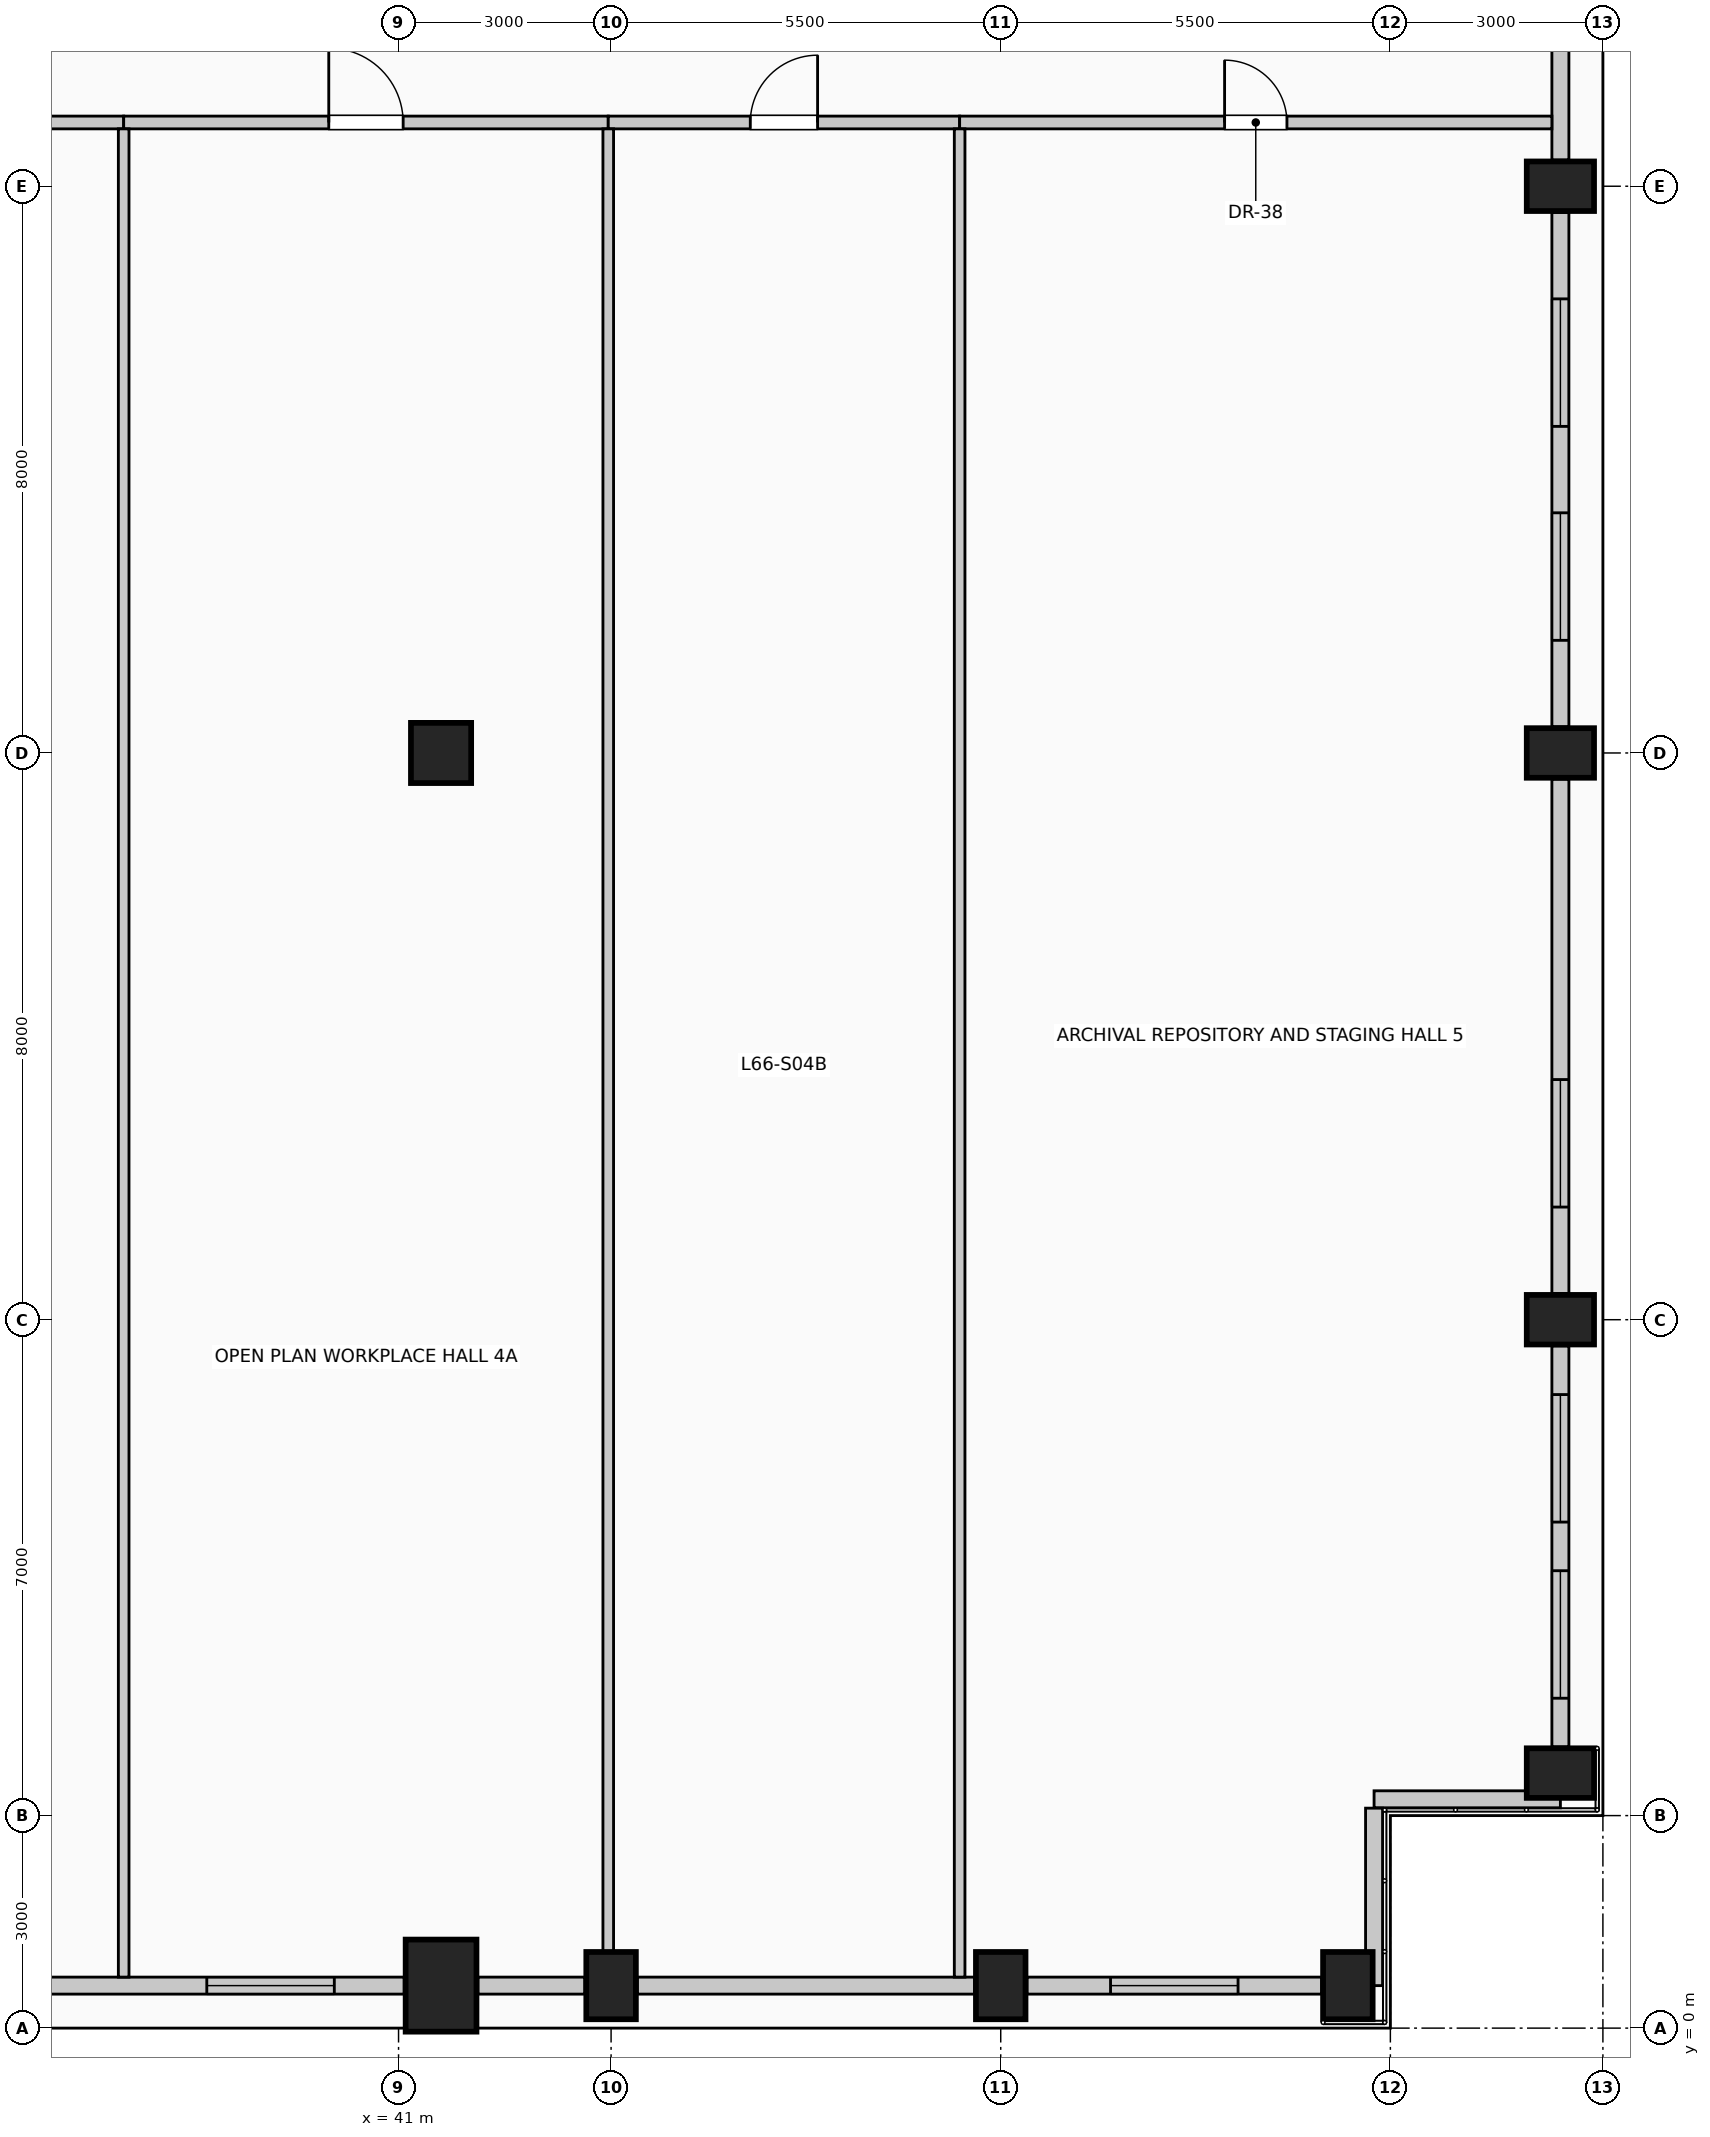
"""IFC4 building model, lengths in metres.
Left out: names, types, materials, properties, quantities, classifications, styles, units other than length and angle.
Written with IfcOpenShell. Run it as: python <this file> out.ifc"""

import sys

from ifc_helpers import new_model, si_unit, direction, frame, frame_2d, origin, origin_2d, place, context, subcontext, project, spatial, rectangle, circle, extrude, element, fill, save


model = new_model("IFC4")
c1 = context("Model", 3, precision=1e-05, world=origin(), true_north=direction((0.0, 1.0)))
c2 = subcontext(c1, "Body", "Model", "MODEL_VIEW")
j1 = project(units=[si_unit("LENGTHUNIT", "METRE"), si_unit("PLANEANGLEUNIT", "RADIAN")], contexts=[c1])
p1 = place(None, origin())
s1 = spatial("IfcSite", under=j1, at=p1, CompositionType="ELEMENT")
p2 = place(p1, origin())
s2 = spatial("IfcBuilding", under=s1, at=p2, CompositionType="ELEMENT")
p3 = place(p2, frame((0.0, 0.0, 272.6)))
s3 = spatial("IfcBuildingStorey", under=s2, at=p3, CompositionType="ELEMENT", Elevation=272.6)
p4 = place(p3, frame((41.6, 0.6, 0.0), z_axis=(0.0, 0.0, 1.0), x_axis=(1.0, 0.0, 0.0)))
e1 = element("IfcColumn", 1, at=p4, inside=s3, PredefinedType="COLUMN", context=c2, shape_type="SweptSolid", body=[
    extrude(rectangle(XDim=1.0, YDim=1.3, at=origin_2d()), origin(), (0.0, 0.0, 1.0), 4.0),
])
for number, where, z_axis, x_axis in (
    (2, (44.0, 0.6, 0.0), (0.0, 0.0, 1.0), (1.0, 0.0, 0.0)),
    (3, (49.5, 0.6, 0.0), (0.0, 0.0, 1.0), (1.0, 0.0, 0.0)),
    (4, (54.4, 0.6, 0.0), (0.0, 0.0, 1.0), (1.0, 0.0, 0.0)),
    (5, (57.4, 3.6, 0.0), (0.0, 0.0, 1.0), (0.0, 1.0, 0.0)),
    (6, (57.4, 10.0, 0.0), (0.0, 0.0, 1.0), (0.0, 1.0, 0.0)),
    (7, (57.4, 18.0, 0.0), (0.0, 0.0, 1.0), (0.0, 1.0, 0.0)),
    (8, (57.4, 26.0, 0.0), (0.0, 0.0, 1.0), (0.0, 1.0, 0.0)),
):
    element("IfcColumn", number, at=place(p3, frame(where, z_axis=z_axis, x_axis=x_axis)), inside=s3, PredefinedType="COLUMN", context=c2, shape_type="SweptSolid", body=[
        extrude(rectangle(XDim=0.7, YDim=0.95, at=origin_2d()), origin(), (0.0, 0.0, 1.0), 4.0),
    ])
p5 = place(p3, frame((41.6, 18.0, 0.0), z_axis=(0.0, 0.0, 1.0), x_axis=(1.0, 0.0, 0.0)))
e9 = element("IfcColumn", 9, at=p5, inside=s3, PredefinedType="COLUMN", context=c2, shape_type="SweptSolid", body=[
    extrude(circle(Radius=0.425, at=origin_2d()), origin(), (0.0, 0.0, 1.0), 4.0),
])
p6 = place(p3, frame((41.08, 0.6, 0.0), z_axis=(0.0, 0.0, 1.0), x_axis=(-1.0, 0.0, 0.0)))
e10 = element("IfcWall", 10, at=p6, inside=s3, PredefinedType="SOLIDWALL", context=c2, shape_type="SweptSolid", body=[
    extrude(rectangle(XDim=6.56, YDim=0.24, at=frame_2d((3.28, 0.0))), origin(), (0.0, 0.0, 1.0), 3.0),
])
p7 = place(p6, frame((0.987, 0.0, 0.42)))
e11 = element("IfcOpeningElement", 11, at=p7, cuts=e10, PredefinedType="OPENING", context=c2, shape_type="SweptSolid", body=[
    extrude(rectangle(XDim=1.8, YDim=2.2, at=frame_2d((0.9, 1.1))), frame((0.0, 0.13, 0.0), z_axis=(0.0, -1.0, 0.0), x_axis=(1.0, 0.0, 0.0)), (0.0, 0.0, 1.0), 0.26),
])
p8 = place(p3, frame((43.63, 0.6, 0.0), z_axis=(0.0, 0.0, 1.0), x_axis=(-1.0, 0.0, 0.0)))
e12 = element("IfcWall", 12, at=p8, inside=s3, PredefinedType="SOLIDWALL", context=c2, shape_type="SweptSolid", body=[
    extrude(rectangle(XDim=1.51, YDim=0.24, at=frame_2d((0.755, 0.0))), origin(), (0.0, 0.0, 1.0), 3.0),
])
p9 = place(p3, frame((49.13, 0.6, 0.0), z_axis=(0.0, 0.0, 1.0), x_axis=(-1.0, 0.0, 0.0)))
e13 = element("IfcWall", 13, at=p9, inside=s3, PredefinedType="SOLIDWALL", context=c2, shape_type="SweptSolid", body=[
    extrude(rectangle(XDim=4.76, YDim=0.24, at=frame_2d((2.38, 0.0))), origin(), (0.0, 0.0, 1.0), 3.0),
])
p10 = place(p3, frame((54.03, 0.6, 0.0), z_axis=(0.0, 0.0, 1.0), x_axis=(-1.0, 0.0, 0.0)))
e14 = element("IfcWall", 14, at=p10, inside=s3, PredefinedType="SOLIDWALL", context=c2, shape_type="SweptSolid", body=[
    extrude(rectangle(XDim=4.16, YDim=0.24, at=frame_2d((2.08, 0.0))), origin(), (0.0, 0.0, 1.0), 3.0),
])
p11 = place(p10, frame((1.18, 0.0, 0.42)))
e15 = element("IfcOpeningElement", 15, at=p11, cuts=e14, PredefinedType="OPENING", context=c2, shape_type="SweptSolid", body=[
    extrude(rectangle(XDim=1.8, YDim=2.2, at=frame_2d((0.9, 1.1))), frame((0.0, 0.13, 0.0), z_axis=(0.0, -1.0, 0.0), x_axis=(1.0, 0.0, 0.0)), (0.0, 0.0, 1.0), 0.26),
])
p12 = place(p3, frame((57.4, 9.63, 0.0), z_axis=(0.0, 0.0, 1.0), x_axis=(0.0, -1.0, 0.0)))
e16 = element("IfcWall", 16, at=p12, inside=s3, PredefinedType="SOLIDWALL", context=c2, shape_type="SweptSolid", body=[
    extrude(rectangle(XDim=5.66, YDim=0.24, at=frame_2d((2.83, 0.0))), origin(), (0.0, 0.0, 1.0), 3.0),
])
p13 = place(p12, frame((0.687, 0.0, 0.42)))
e17 = element("IfcOpeningElement", 17, at=p13, cuts=e16, PredefinedType="OPENING", context=c2, shape_type="SweptSolid", body=[
    extrude(rectangle(XDim=1.8, YDim=2.2, at=frame_2d((0.9, 1.1))), frame((0.0, 0.13, 0.0), z_axis=(0.0, -1.0, 0.0), x_axis=(1.0, 0.0, 0.0)), (0.0, 0.0, 1.0), 0.26),
])
p14 = place(p12, frame((3.173, 0.0, 0.42)))
e18 = element("IfcOpeningElement", 18, at=p14, cuts=e16, PredefinedType="OPENING", context=c2, shape_type="SweptSolid", body=[
    extrude(rectangle(XDim=1.8, YDim=2.2, at=frame_2d((0.9, 1.1))), frame((0.0, 0.13, 0.0), z_axis=(0.0, -1.0, 0.0), x_axis=(1.0, 0.0, 0.0)), (0.0, 0.0, 1.0), 0.26),
])
p15 = place(p3, frame((57.4, 17.63, 0.0), z_axis=(0.0, 0.0, 1.0), x_axis=(0.0, -1.0, 0.0)))
e19 = element("IfcWall", 19, at=p15, inside=s3, PredefinedType="SOLIDWALL", context=c2, shape_type="SweptSolid", body=[
    extrude(rectangle(XDim=7.26, YDim=0.24, at=frame_2d((3.63, 0.0))), origin(), (0.0, 0.0, 1.0), 3.0),
])
p16 = place(p15, frame((4.24, 0.0, 0.42)))
e20 = element("IfcOpeningElement", 20, at=p16, cuts=e19, PredefinedType="OPENING", context=c2, shape_type="SweptSolid", body=[
    extrude(rectangle(XDim=1.8, YDim=2.2, at=frame_2d((0.9, 1.1))), frame((0.0, 0.13, 0.0), z_axis=(0.0, -1.0, 0.0), x_axis=(1.0, 0.0, 0.0)), (0.0, 0.0, 1.0), 0.26),
])
p17 = place(p3, frame((57.4, 25.63, 0.0), z_axis=(0.0, 0.0, 1.0), x_axis=(0.0, -1.0, 0.0)))
e21 = element("IfcWall", 21, at=p17, inside=s3, PredefinedType="SOLIDWALL", context=c2, shape_type="SweptSolid", body=[
    extrude(rectangle(XDim=7.26, YDim=0.24, at=frame_2d((3.63, 0.0))), origin(), (0.0, 0.0, 1.0), 3.0),
])
p18 = place(p17, frame((1.22, 0.0, 0.42)))
e22 = element("IfcOpeningElement", 22, at=p18, cuts=e21, PredefinedType="OPENING", context=c2, shape_type="SweptSolid", body=[
    extrude(rectangle(XDim=1.8, YDim=2.2, at=frame_2d((0.9, 1.1))), frame((0.0, 0.13, 0.0), z_axis=(0.0, -1.0, 0.0), x_axis=(1.0, 0.0, 0.0)), (0.0, 0.0, 1.0), 0.26),
])
p19 = place(p17, frame((4.24, 0.0, 0.42)))
e23 = element("IfcOpeningElement", 23, at=p19, cuts=e21, PredefinedType="OPENING", context=c2, shape_type="SweptSolid", body=[
    extrude(rectangle(XDim=1.8, YDim=2.2, at=frame_2d((0.9, 1.1))), frame((0.0, 0.13, 0.0), z_axis=(0.0, -1.0, 0.0), x_axis=(1.0, 0.0, 0.0)), (0.0, 0.0, 1.0), 0.26),
])
p20 = place(p3, frame((57.4, 33.63, 0.0), z_axis=(0.0, 0.0, 1.0), x_axis=(0.0, -1.0, 0.0)))
e24 = element("IfcWall", 24, at=p20, inside=s3, PredefinedType="SOLIDWALL", context=c2, shape_type="SweptSolid", body=[
    extrude(rectangle(XDim=7.26, YDim=0.24, at=frame_2d((3.63, 0.0))), origin(), (0.0, 0.0, 1.0), 3.0),
])
p21 = place(p3, frame((57.4, 3.23, 0.0), z_axis=(0.0, 0.0, 1.0), x_axis=(-1.0, 0.0, 0.0)))
e25 = element("IfcWall", 25, at=p21, inside=s3, PredefinedType="SOLIDWALL", context=c2, shape_type="SweptSolid", body=[
    extrude(rectangle(XDim=2.63, YDim=0.24, at=frame_2d((1.315, 0.0))), origin(), (0.0, 0.0, 1.0), 3.75),
])
p22 = place(p3, frame((54.77, 3.105, 0.0), z_axis=(0.0, 0.0, 1.0), x_axis=(0.0, -1.0, 0.0)))
e26 = element("IfcWall", 26, at=p22, inside=s3, PredefinedType="SOLIDWALL", context=c2, shape_type="SweptSolid", body=[
    extrude(rectangle(XDim=2.505, YDim=0.24, at=frame_2d((1.252, 0.0))), origin(), (0.0, 0.0, 1.0), 3.75),
])
p23 = place(p3, frame((23.1, 26.9, 0.0), z_axis=(0.0, 0.0, 1.0), x_axis=(1.0, 0.0, 0.0)))
e27 = element("IfcWall", 27, at=p23, inside=s3, PredefinedType="PARTITIONING", context=c2, shape_type="SweptSolid", body=[
    extrude(rectangle(XDim=14.02, YDim=0.18, at=frame_2d((7.01, 0.0))), origin(), (0.0, 0.0, 1.0), 3.75),
])
p24 = place(p23, frame((6.535, 0.0, 0.0)))
e28 = element("IfcOpeningElement", 28, at=p24, cuts=e27, PredefinedType="OPENING", context=c2, shape_type="SweptSolid", body=[
    extrude(rectangle(XDim=0.95, YDim=2.15, at=frame_2d((0.475, 1.075))), frame((0.0, 0.1, 0.0), z_axis=(0.0, -1.0, 0.0), x_axis=(1.0, 0.0, 0.0)), (0.0, 0.0, 1.0), 0.2),
])
p25 = place(p3, frame((37.12, 26.9, 0.0), z_axis=(0.0, 0.0, 1.0), x_axis=(1.0, 0.0, 0.0)))
e29 = element("IfcWall", 29, at=p25, inside=s3, PredefinedType="PARTITIONING", context=c2, shape_type="SweptSolid", body=[
    extrude(rectangle(XDim=6.84, YDim=0.18, at=frame_2d((3.42, 0.0))), origin(), (0.0, 0.0, 1.0), 3.75),
])
p26 = place(p25, frame((2.895, 0.0, 0.0)))
e30 = element("IfcOpeningElement", 30, at=p26, cuts=e29, PredefinedType="OPENING", context=c2, shape_type="SweptSolid", body=[
    extrude(rectangle(XDim=1.05, YDim=2.15, at=frame_2d((0.525, 1.075))), frame((0.0, 0.1, 0.0), z_axis=(0.0, -1.0, 0.0), x_axis=(1.0, 0.0, 0.0)), (0.0, 0.0, 1.0), 0.2),
])
p27 = place(p3, frame((43.96, 26.9, 0.0), z_axis=(0.0, 0.0, 1.0), x_axis=(1.0, 0.0, 0.0)))
e31 = element("IfcWall", 31, at=p27, inside=s3, PredefinedType="PARTITIONING", context=c2, shape_type="SweptSolid", body=[
    extrude(rectangle(XDim=4.96, YDim=0.18, at=frame_2d((2.48, 0.0))), origin(), (0.0, 0.0, 1.0), 3.75),
])
p28 = place(p27, frame((2.005, 0.0, 0.0)))
e32 = element("IfcOpeningElement", 32, at=p28, cuts=e31, PredefinedType="OPENING", context=c2, shape_type="SweptSolid", body=[
    extrude(rectangle(XDim=0.95, YDim=2.15, at=frame_2d((0.475, 1.075))), frame((0.0, 0.1, 0.0), z_axis=(0.0, -1.0, 0.0), x_axis=(1.0, 0.0, 0.0)), (0.0, 0.0, 1.0), 0.2),
])
p29 = place(p3, frame((48.92, 26.9, 0.0), z_axis=(0.0, 0.0, 1.0), x_axis=(1.0, 0.0, 0.0)))
e33 = element("IfcWall", 33, at=p29, inside=s3, PredefinedType="PARTITIONING", context=c2, shape_type="SweptSolid", body=[
    extrude(rectangle(XDim=8.36, YDim=0.18, at=frame_2d((4.18, 0.0))), origin(), (0.0, 0.0, 1.0), 3.75),
])
p30 = place(p29, frame((3.74, 0.0, 0.0)))
e34 = element("IfcOpeningElement", 34, at=p30, cuts=e33, PredefinedType="OPENING", context=c2, shape_type="SweptSolid", body=[
    extrude(rectangle(XDim=0.88, YDim=2.1, at=frame_2d((0.44, 1.05))), frame((0.0, 0.1, 0.0), z_axis=(0.0, -1.0, 0.0), x_axis=(1.0, 0.0, 0.0)), (0.0, 0.0, 1.0), 0.2),
])
p31 = place(p3, frame((37.12, 0.72, 0.0), z_axis=(0.0, 0.0, 1.0), x_axis=(0.0, 1.0, 0.0)))
e35 = element("IfcWall", 35, at=p31, inside=s3, PredefinedType="PARTITIONING", context=c2, shape_type="SweptSolid", body=[
    extrude(rectangle(XDim=26.09, YDim=0.15, at=frame_2d((13.045, 0.0))), origin(), (0.0, 0.0, 1.0), 3.75),
])
p32 = place(p3, frame((43.96, 1.075, 0.0), z_axis=(0.0, 0.0, 1.0), x_axis=(0.0, 1.0, 0.0)))
e36 = element("IfcWall", 36, at=p32, inside=s3, PredefinedType="PARTITIONING", context=c2, shape_type="SweptSolid", body=[
    extrude(rectangle(XDim=25.735, YDim=0.15, at=frame_2d((12.868, 0.0))), origin(), (0.0, 0.0, 1.0), 3.75),
])
p33 = place(p3, frame((48.92, 0.72, 0.0), z_axis=(0.0, 0.0, 1.0), x_axis=(0.0, 1.0, 0.0)))
e37 = element("IfcWall", 37, at=p33, inside=s3, PredefinedType="PARTITIONING", context=c2, shape_type="SweptSolid", body=[
    extrude(rectangle(XDim=26.09, YDim=0.15, at=frame_2d((13.045, 0.0))), origin(), (0.0, 0.0, 1.0), 3.75),
])
p34 = place(p7, origin())
e38 = element("IfcWindow", 38, at=p34, inside=s3, PartitioningType="SINGLE_PANEL", PredefinedType="WINDOW", context=c2, shape_type="SweptSolid", body=[
    extrude(rectangle(XDim=1.8, YDim=2.2, at=frame_2d((0.9, 1.1))), frame((0.0, 0.03, 0.0), z_axis=(0.0, -1.0, 0.0), x_axis=(1.0, 0.0, 0.0)), (0.0, 0.0, 1.0), 0.06),
])
fill(e11, e38)
p35 = place(p11, origin())
e39 = element("IfcWindow", 39, at=p35, inside=s3, PartitioningType="SINGLE_PANEL", PredefinedType="WINDOW", context=c2, shape_type="SweptSolid", body=[
    extrude(rectangle(XDim=1.8, YDim=2.2, at=frame_2d((0.9, 1.1))), frame((0.0, 0.03, 0.0), z_axis=(0.0, -1.0, 0.0), x_axis=(1.0, 0.0, 0.0)), (0.0, 0.0, 1.0), 0.06),
])
fill(e15, e39)
p36 = place(p13, origin())
e40 = element("IfcWindow", 40, at=p36, inside=s3, PartitioningType="SINGLE_PANEL", PredefinedType="WINDOW", context=c2, shape_type="SweptSolid", body=[
    extrude(rectangle(XDim=1.8, YDim=2.2, at=frame_2d((0.9, 1.1))), frame((0.0, 0.03, 0.0), z_axis=(0.0, -1.0, 0.0), x_axis=(1.0, 0.0, 0.0)), (0.0, 0.0, 1.0), 0.06),
])
fill(e17, e40)
p37 = place(p14, origin())
e41 = element("IfcWindow", 41, at=p37, inside=s3, PartitioningType="SINGLE_PANEL", PredefinedType="WINDOW", context=c2, shape_type="SweptSolid", body=[
    extrude(rectangle(XDim=1.8, YDim=2.2, at=frame_2d((0.9, 1.1))), frame((0.0, 0.03, 0.0), z_axis=(0.0, -1.0, 0.0), x_axis=(1.0, 0.0, 0.0)), (0.0, 0.0, 1.0), 0.06),
])
fill(e18, e41)
p38 = place(p16, origin())
e42 = element("IfcWindow", 42, at=p38, inside=s3, PartitioningType="SINGLE_PANEL", PredefinedType="WINDOW", context=c2, shape_type="SweptSolid", body=[
    extrude(rectangle(XDim=1.8, YDim=2.2, at=frame_2d((0.9, 1.1))), frame((0.0, 0.03, 0.0), z_axis=(0.0, -1.0, 0.0), x_axis=(1.0, 0.0, 0.0)), (0.0, 0.0, 1.0), 0.06),
])
fill(e20, e42)
p39 = place(p18, origin())
e43 = element("IfcWindow", 43, at=p39, inside=s3, PartitioningType="SINGLE_PANEL", PredefinedType="WINDOW", context=c2, shape_type="SweptSolid", body=[
    extrude(rectangle(XDim=1.8, YDim=2.2, at=frame_2d((0.9, 1.1))), frame((0.0, 0.03, 0.0), z_axis=(0.0, -1.0, 0.0), x_axis=(1.0, 0.0, 0.0)), (0.0, 0.0, 1.0), 0.06),
])
fill(e22, e43)
p40 = place(p19, origin())
e44 = element("IfcWindow", 44, at=p40, inside=s3, PartitioningType="SINGLE_PANEL", PredefinedType="WINDOW", context=c2, shape_type="SweptSolid", body=[
    extrude(rectangle(XDim=1.8, YDim=2.2, at=frame_2d((0.9, 1.1))), frame((0.0, 0.03, 0.0), z_axis=(0.0, -1.0, 0.0), x_axis=(1.0, 0.0, 0.0)), (0.0, 0.0, 1.0), 0.06),
])
fill(e23, e44)
p41 = place(p26, origin())
e45 = element("IfcDoor", 45, at=p41, inside=s3, OperationType="SINGLE_SWING_LEFT", PredefinedType="DOOR", context=c2, shape_type="SweptSolid", body=[
    extrude(rectangle(XDim=1.05, YDim=2.15, at=frame_2d((0.525, 1.075))), frame((0.0, 0.025, 0.0), z_axis=(0.0, -1.0, 0.0), x_axis=(1.0, 0.0, 0.0)), (0.0, 0.0, 1.0), 0.05),
])
fill(e30, e45)
p42 = place(p28, origin())
e46 = element("IfcDoor", 46, at=p42, inside=s3, OperationType="SINGLE_SWING_RIGHT", PredefinedType="DOOR", context=c2, shape_type="SweptSolid", body=[
    extrude(rectangle(XDim=0.95, YDim=2.15, at=frame_2d((0.475, 1.075))), frame((0.0, 0.025, 0.0), z_axis=(0.0, -1.0, 0.0), x_axis=(1.0, 0.0, 0.0)), (0.0, 0.0, 1.0), 0.05),
])
fill(e32, e46)
p43 = place(p30, origin())
e47 = element("IfcDoor", 47, at=p43, inside=s3, OperationType="SINGLE_SWING_LEFT", PredefinedType="DOOR", context=c2, shape_type="SweptSolid", body=[
    extrude(rectangle(XDim=0.88, YDim=2.1, at=frame_2d((0.44, 1.05))), frame((0.0, 0.025, 0.0), z_axis=(0.0, -1.0, 0.0), x_axis=(1.0, 0.0, 0.0)), (0.0, 0.0, 1.0), 0.05),
])
fill(e34, e47)
save(model, sys.argv[1])
